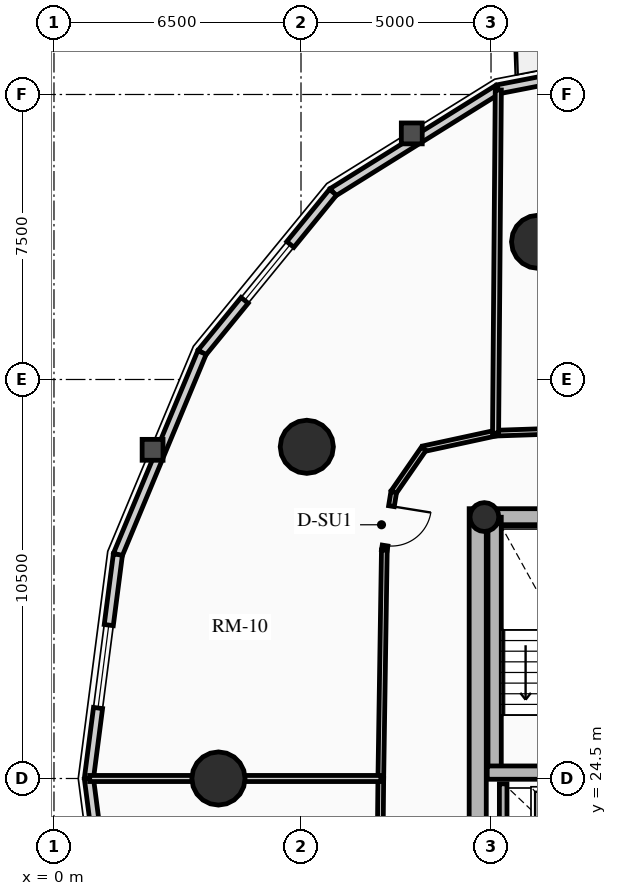
"""IFC4 building model, lengths in metres.
Left out: names, types, materials, properties, quantities, classifications, styles, units other than length and angle.
Written with IfcOpenShell. Run it as: python <this file> out.ifc"""

import sys

from ifc_helpers import new_model, si_unit, direction, frame, frame_2d, origin, origin_2d, place, context, subcontext, project, spatial, rectangle, circle, hollow_circle, extrude, source, transform, mapped, element, fill, save


model = new_model("IFC4")
c1 = context("Model", 3, precision=1e-05, world=origin(), true_north=direction((0.0, 1.0)))
c2 = subcontext(c1, "Body", "Model", "MODEL_VIEW")
j1 = project(units=[si_unit("LENGTHUNIT", "METRE"), si_unit("PLANEANGLEUNIT", "RADIAN")], contexts=[c1])
p1 = place(None, origin())
s1 = spatial("IfcSite", under=j1, at=p1, CompositionType="ELEMENT")
p2 = place(p1, origin())
s2 = spatial("IfcBuilding", under=s1, at=p2, CompositionType="ELEMENT")
p3 = place(p2, frame((0.0, 0.0, 70.15)))
s3 = spatial("IfcBuildingStorey", under=s2, at=p3, CompositionType="ELEMENT", Elevation=70.15)
p4 = place(p3, frame((11.15, 17.4, 0.0), z_axis=(0.0, 0.0, 1.0), x_axis=(0.0, 1.0, 0.0)))
e1 = element("IfcWall", 1, at=p4, inside=s3, PredefinedType="SHEAR", context=c2, shape_type="SweptSolid", body=[
    extrude(rectangle(XDim=14.2, YDim=0.45, at=frame_2d((7.1, 0.0))), origin(), (0.0, 0.0, 1.0), 2.91),
])
p5 = place(p3, frame((11.15, 31.375, 0.0), z_axis=(0.0, 0.0, 1.0), x_axis=(1.0, 0.0, 0.0)))
e2 = element("IfcWall", 2, at=p5, inside=s3, PredefinedType="SHEAR", context=c2, shape_type="SweptSolid", body=[
    extrude(rectangle(XDim=10.7, YDim=0.45, at=frame_2d((5.35, 0.0))), origin(), (0.0, 0.0, 1.0), 2.91),
])
m1 = source(origin(), c2, "Body", "SweptSolid", [
    extrude(rectangle(XDim=1.5, YDim=2.02, at=frame_2d((0.75, 1.01))), frame((0.0, 0.235, 0.0), z_axis=(0.0, -1.0, 0.0), x_axis=(1.0, 0.0, 0.0)), (0.0, 0.0, 1.0), 0.47),
])
p6 = place(p5, frame((4.6, 0.0, 0.0)))
e3 = element("IfcOpeningElement", 3, at=p6, cuts=e2, PredefinedType="OPENING", context=c2, shape_type="MappedRepresentation", body=[
    mapped(m1, transform((0.0, 0.0, 0.0), x_axis=(1.0, 0.0, 0.0), y_axis=(0.0, 1.0, 0.0), z_axis=(0.0, 0.0, 1.0), scale=1.0)),
])
p7 = place(p3, frame((11.595, 24.655, 0.0), z_axis=(0.0, 0.0, 1.0), x_axis=(0.0, 1.0, 0.0)))
e4 = element("IfcWall", 4, at=p7, inside=s3, PredefinedType="SHEAR", context=c2, shape_type="SweptSolid", body=[
    extrude(rectangle(XDim=6.72, YDim=0.35, at=frame_2d((3.36, 0.0))), origin(), (0.0, 0.0, 1.0), 2.91),
])
p8 = place(p3, frame((11.4, 24.655, 0.0), z_axis=(0.0, 0.0, 1.0), x_axis=(1.0, 0.0, 0.0)))
e5 = element("IfcWall", 5, at=p8, inside=s3, PredefinedType="SHEAR", context=c2, shape_type="SweptSolid", body=[
    extrude(rectangle(XDim=3.285, YDim=0.35, at=frame_2d((1.643, 0.0))), origin(), (0.0, 0.0, 1.0), 2.91),
])
p9 = place(p3, frame((11.325, 31.38, 0.0), z_axis=(0.0, 0.0, 1.0), x_axis=(1.0, 0.0, 0.0)))
e6 = element("IfcColumn", 6, at=p9, inside=s3, PredefinedType="COLUMN", context=c2, shape_type="SweptSolid", body=[
    extrude(hollow_circle(Radius=0.38, WallThickness=0.032, at=origin_2d()), origin(), (0.0, 0.0, 1.0), 2.91),
])
for number, where, z_axis, x_axis in (
    (7, (12.739, 38.623, 0.0), (0.0, 0.0, 1.0), (1.0, 0.0, 0.0)),
    (8, (6.653, 33.229, 0.0), (0.0, 0.0, 1.0), (1.0, 0.0, 0.0)),
    (9, (4.328, 24.5, 0.0), (0.0, 0.0, 1.0), (1.0, 0.0, 0.0)),
):
    element("IfcColumn", number, at=place(p3, frame(where, z_axis=z_axis, x_axis=x_axis)), inside=s3, PredefinedType="USERDEFINED", context=c2, shape_type="SweptSolid", body=[
        extrude(circle(Radius=0.7, at=origin_2d()), origin(), (0.0, 0.0, 1.0), 2.91),
    ])
p10 = place(p3, frame((11.685, 42.637, 0.0), z_axis=(0.0, 0.0, 1.0), x_axis=(0.981723785992, 0.190311344954, 0.0)))
e10 = element("IfcWall", 10, at=p10, inside=s3, PredefinedType="SOLIDWALL", context=c2, shape_type="SweptSolid", body=[
    extrude(rectangle(XDim=4.904, YDim=0.24, at=frame_2d((2.452, 0.0))), origin(), (0.0, 0.0, 1.0), 2.179),
])
m2 = source(origin(), c2, "Body", "SweptSolid", [
    extrude(rectangle(XDim=1.15, YDim=2.005, at=frame_2d((0.575, 1.002))), frame((0.0, 0.13, 0.0), z_axis=(0.0, -1.0, 0.0), x_axis=(1.0, 0.0, 0.0)), (0.0, 0.0, 1.0), 0.26),
])
p11 = place(p10, frame((1.877, 0.0, 0.0)))
e11 = element("IfcOpeningElement", 11, at=p11, cuts=e10, PredefinedType="OPENING", context=c2, shape_type="MappedRepresentation", body=[
    mapped(m2, transform((0.0, 0.0, 0.0), x_axis=(1.0, 0.0, 0.0), y_axis=(0.0, 1.0, 0.0), z_axis=(0.0, 0.0, 1.0), scale=1.0)),
])
p12 = place(p3, frame((7.342, 39.928, 0.0), z_axis=(0.0, 0.0, 1.0), x_axis=(0.848520380187, 0.529162701263, 0.0)))
e12 = element("IfcWall", 12, at=p12, inside=s3, PredefinedType="SOLIDWALL", context=c2, shape_type="SweptSolid", body=[
    extrude(rectangle(XDim=5.119, YDim=0.24, at=frame_2d((2.56, 0.0))), origin(), (0.0, 0.0, 1.0), 2.179),
])
p13 = place(p3, frame((3.895, 35.709, 0.0), z_axis=(0.0, 0.0, 1.0), x_axis=(0.632700781152, 0.77439635945, 0.0)))
e13 = element("IfcWall", 13, at=p13, inside=s3, PredefinedType="SOLIDWALL", context=c2, shape_type="SweptSolid", body=[
    extrude(rectangle(XDim=5.448, YDim=0.24, at=frame_2d((2.724, 0.0))), origin(), (0.0, 0.0, 1.0), 2.179),
])
m3 = source(origin(), c2, "Body", "SweptSolid", [
    extrude(rectangle(XDim=1.9, YDim=1.35, at=frame_2d((0.95, 0.675))), frame((0.0, 0.13, 0.0), z_axis=(0.0, -1.0, 0.0), x_axis=(1.0, 0.0, 0.0)), (0.0, 0.0, 1.0), 0.26),
])
p14 = place(p13, frame((1.774, 0.0, 0.65)))
e14 = element("IfcOpeningElement", 14, at=p14, cuts=e13, PredefinedType="OPENING", context=c2, shape_type="MappedRepresentation", body=[
    mapped(m3, transform((0.0, 0.0, 0.0), x_axis=(1.0, 0.0, 0.0), y_axis=(0.0, 1.0, 0.0), z_axis=(0.0, 0.0, 1.0), scale=1.0)),
])
p15 = place(p3, frame((1.682, 30.393, 0.0), z_axis=(0.0, 0.0, 1.0), x_axis=(0.384344417632, 0.923189779317, 0.0)))
e15 = element("IfcWall", 15, at=p15, inside=s3, PredefinedType="SOLIDWALL", context=c2, shape_type="SweptSolid", body=[
    extrude(rectangle(XDim=5.758, YDim=0.24, at=frame_2d((2.879, 0.0))), origin(), (0.0, 0.0, 1.0), 2.179),
])
p16 = place(p3, frame((0.919, 24.5, 0.0), z_axis=(0.0, 0.0, 1.0), x_axis=(0.128351991996, 0.991728675672, 0.0)))
e16 = element("IfcWall", 16, at=p16, inside=s3, PredefinedType="SOLIDWALL", context=c2, shape_type="SweptSolid", body=[
    extrude(rectangle(XDim=5.942, YDim=0.24, at=frame_2d((2.971, 0.0))), origin(), (0.0, 0.0, 1.0), 2.179),
])
m4 = source(origin(), c2, "Body", "SweptSolid", [
    extrude(rectangle(XDim=2.2, YDim=1.35, at=frame_2d((1.1, 0.675))), frame((0.0, 0.13, 0.0), z_axis=(0.0, -1.0, 0.0), x_axis=(1.0, 0.0, 0.0)), (0.0, 0.0, 1.0), 0.26),
])
p17 = place(p16, frame((1.871, 0.0, 0.65)))
e17 = element("IfcOpeningElement", 17, at=p17, cuts=e16, PredefinedType="OPENING", context=c2, shape_type="MappedRepresentation", body=[
    mapped(m4, transform((0.0, 0.0, 0.0), x_axis=(1.0, 0.0, 0.0), y_axis=(0.0, 1.0, 0.0), z_axis=(0.0, 0.0, 1.0), scale=1.0)),
])
p18 = place(p3, frame((1.682, 18.607, 0.0), z_axis=(0.0, 0.0, 1.0), x_axis=(-0.128351991996, 0.991728675672, 0.0)))
e18 = element("IfcWall", 18, at=p18, inside=s3, PredefinedType="SOLIDWALL", context=c2, shape_type="SweptSolid", body=[
    extrude(rectangle(XDim=5.942, YDim=0.24, at=frame_2d((2.971, 0.0))), origin(), (0.0, 0.0, 1.0), 2.179),
])
p19 = place(p3, frame((11.82, 21.92, 0.0), z_axis=(0.0, 0.0, 1.0), x_axis=(0.0, 1.0, 0.0)))
e19 = element("IfcWall", 19, at=p19, inside=s3, PredefinedType="SHEAR", context=c2, shape_type="SweptSolid", body=[
    extrude(rectangle(XDim=2.44, YDim=0.2, at=frame_2d((1.22, 0.0))), origin(), (0.0, 0.0, 1.0), 2.91),
])
p20 = place(p3, frame((18.143, 33.81, 0.0), z_axis=(0.0, 0.0, 1.0), x_axis=(-0.999423023908, -0.033964971394, 0.0)))
e20 = element("IfcWall", 20, at=p20, inside=s3, PredefinedType="PARTITIONING", context=c2, shape_type="SweptSolid", body=[
    extrude(rectangle(XDim=6.527, YDim=0.15, at=frame_2d((3.263, 0.0))), origin(), (0.0, 0.0, 1.0), 2.225),
])
p21 = place(p3, frame((11.62, 33.588, 0.0), z_axis=(0.0, 0.0, 1.0), x_axis=(-0.977392314559, -0.211433827571, 0.0)))
e21 = element("IfcWall", 21, at=p21, inside=s3, PredefinedType="PARTITIONING", context=c2, shape_type="SweptSolid", body=[
    extrude(rectangle(XDim=1.934, YDim=0.15, at=frame_2d((0.967, 0.0))), origin(), (0.0, 0.0, 1.0), 2.225),
])
p22 = place(p3, frame((9.729, 33.179, 0.0), z_axis=(0.0, 0.0, 1.0), x_axis=(-0.569155068352, -0.822230203878, 0.0)))
e22 = element("IfcWall", 22, at=p22, inside=s3, PredefinedType="PARTITIONING", context=c2, shape_type="SweptSolid", body=[
    extrude(rectangle(XDim=1.387, YDim=0.15, at=frame_2d((0.694, 0.0))), origin(), (0.0, 0.0, 1.0), 2.225),
])
p23 = place(p3, frame((8.94, 32.038, 0.0), z_axis=(0.0, 0.0, 1.0), x_axis=(-0.159917336462, -0.987130409571, 0.0)))
e23 = element("IfcWall", 23, at=p23, inside=s3, PredefinedType="PARTITIONING", context=c2, shape_type="SweptSolid", body=[
    extrude(rectangle(XDim=1.547, YDim=0.15, at=frame_2d((0.773, 0.0))), origin(), (0.0, 0.0, 1.0), 2.225),
])
m5 = source(origin(), c2, "Body", "SweptSolid", [
    extrude(rectangle(XDim=1.05, YDim=2.015, at=frame_2d((0.525, 1.007))), frame((0.0, 0.085, 0.0), z_axis=(0.0, -1.0, 0.0), x_axis=(1.0, 0.0, 0.0)), (0.0, 0.0, 1.0), 0.17),
])
p24 = place(p23, frame((0.377, 0.0, 0.0)))
e24 = element("IfcOpeningElement", 24, at=p24, cuts=e23, PredefinedType="OPENING", context=c2, shape_type="MappedRepresentation", body=[
    mapped(m5, transform((0.0, 0.0, 0.0), x_axis=(1.0, 0.0, 0.0), y_axis=(0.0, 1.0, 0.0), z_axis=(0.0, 0.0, 1.0), scale=1.0)),
])
p25 = place(p3, frame((8.693, 30.512, 0.0), z_axis=(0.0, 0.0, 1.0), x_axis=(-0.015389665197, -0.99988157209, 0.0)))
e25 = element("IfcWall", 25, at=p25, inside=s3, PredefinedType="PARTITIONING", context=c2, shape_type="SweptSolid", body=[
    extrude(rectangle(XDim=6.012, YDim=0.15, at=frame_2d((3.006, 0.0))), origin(), (0.0, 0.0, 1.0), 2.655),
])
p26 = place(p3, frame((8.6, 24.5, 0.0), z_axis=(0.0, 0.0, 1.0), x_axis=(-0.010076760723, -0.999949228158, 0.0)))
e26 = element("IfcWall", 26, at=p26, inside=s3, PredefinedType="PARTITIONING", context=c2, shape_type="SweptSolid", body=[
    extrude(rectangle(XDim=6.13, YDim=0.15, at=frame_2d((3.065, 0.0))), origin(), (0.0, 0.0, 1.0), 2.225),
])
p27 = place(p3, frame((11.62, 33.588, 0.0), z_axis=(0.0, 0.0, 1.0), x_axis=(0.007921667836, 0.999968623097, 0.0)))
e27 = element("IfcWall", 27, at=p27, inside=s3, PredefinedType="PARTITIONING", context=c2, shape_type="SweptSolid", body=[
    extrude(rectangle(XDim=9.03, YDim=0.16, at=frame_2d((4.515, 0.0))), origin(), (0.0, 0.0, 1.0), 2.179),
])
p28 = place(p3, frame((8.6, 24.5, 0.0), z_axis=(0.0, 0.0, 1.0), x_axis=(-1.0, 0.0, 0.0)))
e28 = element("IfcWall", 28, at=p28, inside=s3, PredefinedType="PARTITIONING", context=c2, shape_type="SweptSolid", body=[
    extrude(rectangle(XDim=7.661, YDim=0.16, at=frame_2d((3.831, 0.0))), origin(), (0.0, 0.0, 1.0), 2.179),
])
m6 = source(origin(), c2, "Body", "SweptSolid", [
    extrude(rectangle(XDim=1.9, YDim=1.35, at=frame_2d((0.95, 0.675))), frame((0.0, 0.03, 0.0), z_axis=(0.0, -1.0, 0.0), x_axis=(1.0, 0.0, 0.0)), (0.0, 0.0, 1.0), 0.06),
])
p29 = place(p14, origin())
e29 = element("IfcWindow", 29, at=p29, inside=s3, PartitioningType="DOUBLE_PANEL_VERTICAL", PredefinedType="WINDOW", context=c2, shape_type="MappedRepresentation", body=[
    mapped(m6, transform((0.0, 0.0, 0.0), x_axis=(1.0, 0.0, 0.0), y_axis=(0.0, 1.0, 0.0), z_axis=(0.0, 0.0, 1.0), scale=1.0)),
])
fill(e14, e29)
m7 = source(origin(), c2, "Body", "SweptSolid", [
    extrude(rectangle(XDim=2.2, YDim=1.35, at=frame_2d((1.1, 0.675))), frame((0.0, 0.03, 0.0), z_axis=(0.0, -1.0, 0.0), x_axis=(1.0, 0.0, 0.0)), (0.0, 0.0, 1.0), 0.06),
])
p30 = place(p17, origin())
e30 = element("IfcWindow", 30, at=p30, inside=s3, PartitioningType="DOUBLE_PANEL_VERTICAL", PredefinedType="WINDOW", context=c2, shape_type="MappedRepresentation", body=[
    mapped(m7, transform((0.0, 0.0, 0.0), x_axis=(1.0, 0.0, 0.0), y_axis=(0.0, 1.0, 0.0), z_axis=(0.0, 0.0, 1.0), scale=1.0)),
])
fill(e17, e30)
m8 = source(origin(), c2, "Body", "SweptSolid", [
    extrude(rectangle(XDim=1.05, YDim=2.015, at=frame_2d((0.525, 1.007))), frame((0.0, 0.025, 0.0), z_axis=(0.0, -1.0, 0.0), x_axis=(1.0, 0.0, 0.0)), (0.0, 0.0, 1.0), 0.05),
])
p31 = place(p24, origin())
e31 = element("IfcDoor", 31, at=p31, inside=s3, OperationType="SINGLE_SWING_LEFT", PredefinedType="DOOR", context=c2, shape_type="MappedRepresentation", body=[
    mapped(m8, transform((0.0, 0.0, 0.0), x_axis=(1.0, 0.0, 0.0), y_axis=(0.0, 1.0, 0.0), z_axis=(0.0, 0.0, 1.0), scale=1.0)),
])
fill(e24, e31)
save(model, sys.argv[1])
